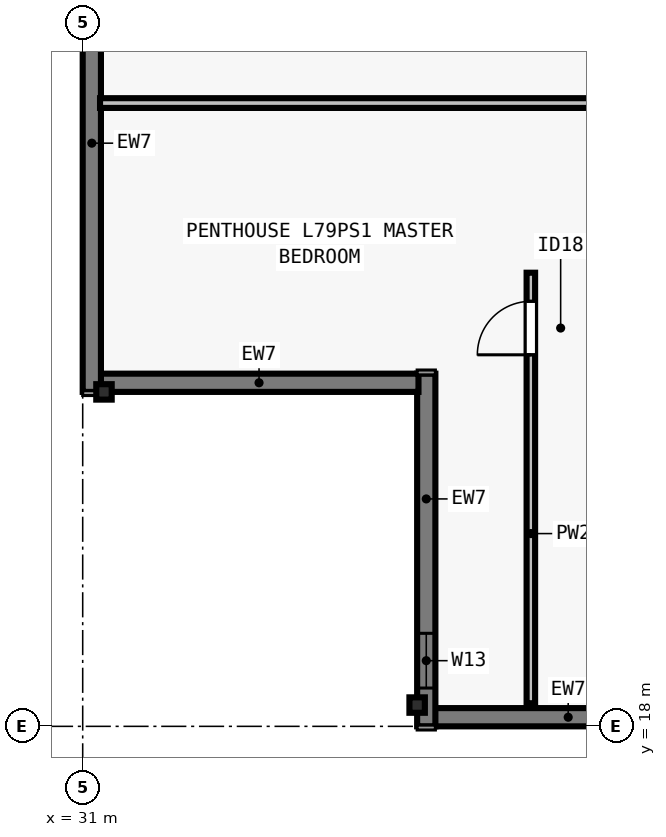
"""IFC4 building model, lengths in metres.
Left out: names, types, materials, properties, quantities, classifications, styles, units other than length and angle.
Written with IfcOpenShell. Run it as: python <this file> out.ifc"""

import sys

from ifc_helpers import new_model, si_unit, direction, frame, frame_2d, origin, origin_2d, place, context, subcontext, project, spatial, rectangle, i_section, extrude, element, fill, save


model = new_model("IFC4")
c1 = context("Model", 3, precision=1e-05, world=origin(), true_north=direction((0.0, 1.0)))
c2 = subcontext(c1, "Body", "Model", "MODEL_VIEW")
j1 = project(units=[si_unit("LENGTHUNIT", "METRE"), si_unit("PLANEANGLEUNIT", "RADIAN")], contexts=[c1])
p1 = place(None, origin())
s1 = spatial("IfcSite", under=j1, at=p1, CompositionType="ELEMENT")
p2 = place(p1, origin())
s2 = spatial("IfcBuilding", under=s1, at=p2, CompositionType="ELEMENT")
p3 = place(p2, frame((0.0, 0.0, 287.5)))
s3 = spatial("IfcBuildingStorey", under=s2, at=p3, CompositionType="ELEMENT", Elevation=287.5)
for number, where, z_axis, x_axis in (
    (1, (36.5, 18.35, 0.0), (0.0, 0.0, 1.0), (1.0, 0.0, 0.0)),
    (2, (31.35, 23.5, 0.0), (0.0, 0.0, 1.0), (0.0, 1.0, 0.0)),
):
    element("IfcColumn", number, at=place(p3, frame(where, z_axis=z_axis, x_axis=x_axis)), inside=s3, PredefinedType="COLUMN", context=c2, shape_type="SweptSolid", body=[
        extrude(i_section(OverallWidth=0.254, OverallDepth=0.254, WebThickness=0.009, FlangeThickness=0.014, FilletRadius=0.013, at=origin_2d()), origin(), (0.0, 0.0, 1.0), 3.5),
    ])
p4 = place(p3, frame((59.0, 18.15, 0.0), z_axis=(0.0, 0.0, 1.0), x_axis=(-1.0, 0.0, 0.0)))
e3 = element("IfcWall", 3, at=p4, inside=s3, PredefinedType="SOLIDWALL", context=c2, shape_type="SweptSolid", body=[
    extrude(rectangle(XDim=22.222, YDim=0.3, at=frame_2d((11.111, 0.0))), origin(), (0.0, 0.0, 1.0), 3.29),
])
p5 = place(p4, frame((2.812, 0.0, 0.8)))
e4 = element("IfcOpeningElement", 4, at=p5, cuts=e3, PredefinedType="OPENING", context=c2, shape_type="SweptSolid", body=[
    extrude(rectangle(XDim=2.0, YDim=1.758, at=frame_2d((1.0, 0.879))), frame((0.0, 0.16, 0.0), z_axis=(0.0, -1.0, 0.0), x_axis=(1.0, 0.0, 0.0)), (0.0, 0.0, 1.0), 0.32),
])
p6 = place(p4, frame((6.012, 0.0, 0.8)))
e5 = element("IfcOpeningElement", 5, at=p6, cuts=e3, PredefinedType="OPENING", context=c2, shape_type="SweptSolid", body=[
    extrude(rectangle(XDim=1.65, YDim=1.758, at=frame_2d((0.825, 0.879))), frame((0.0, 0.16, 0.0), z_axis=(0.0, -1.0, 0.0), x_axis=(1.0, 0.0, 0.0)), (0.0, 0.0, 1.0), 0.32),
])
p7 = place(p4, frame((8.811, 0.0, 0.8)))
e6 = element("IfcOpeningElement", 6, at=p7, cuts=e3, PredefinedType="OPENING", context=c2, shape_type="SweptSolid", body=[
    extrude(rectangle(XDim=2.0, YDim=1.758, at=frame_2d((1.0, 0.879))), frame((0.0, 0.16, 0.0), z_axis=(0.0, -1.0, 0.0), x_axis=(1.0, 0.0, 0.0)), (0.0, 0.0, 1.0), 0.32),
])
p8 = place(p4, frame((12.41, 0.0, 0.8)))
e7 = element("IfcOpeningElement", 7, at=p8, cuts=e3, PredefinedType="OPENING", context=c2, shape_type="SweptSolid", body=[
    extrude(rectangle(XDim=1.65, YDim=1.758, at=frame_2d((0.825, 0.879))), frame((0.0, 0.16, 0.0), z_axis=(0.0, -1.0, 0.0), x_axis=(1.0, 0.0, 0.0)), (0.0, 0.0, 1.0), 0.32),
])
p9 = place(p4, frame((15.66, 0.0, 0.8)))
e8 = element("IfcOpeningElement", 8, at=p9, cuts=e3, PredefinedType="OPENING", context=c2, shape_type="SweptSolid", body=[
    extrude(rectangle(XDim=2.0, YDim=1.758, at=frame_2d((1.0, 0.879))), frame((0.0, 0.16, 0.0), z_axis=(0.0, -1.0, 0.0), x_axis=(1.0, 0.0, 0.0)), (0.0, 0.0, 1.0), 0.32),
])
p10 = place(p3, frame((36.65, 18.0, 0.0), z_axis=(0.0, 0.0, 1.0), x_axis=(0.0, 1.0, 0.0)))
e9 = element("IfcWall", 9, at=p10, inside=s3, PredefinedType="SOLIDWALL", context=c2, shape_type="SweptSolid", body=[
    extrude(rectangle(XDim=5.8, YDim=0.3, at=frame_2d((2.9, 0.0))), origin(), (0.0, 0.0, 1.0), 3.29),
])
p11 = place(p10, frame((0.63, 0.0, 0.8)))
e10 = element("IfcOpeningElement", 10, at=p11, cuts=e9, PredefinedType="OPENING", context=c2, shape_type="SweptSolid", body=[
    extrude(rectangle(XDim=0.9, YDim=1.75, at=frame_2d((0.45, 0.875))), frame((0.0, 0.16, 0.0), z_axis=(0.0, -1.0, 0.0), x_axis=(1.0, 0.0, 0.0)), (0.0, 0.0, 1.0), 0.32),
])
p12 = place(p3, frame((36.522, 23.65, 0.0), z_axis=(0.0, 0.0, 1.0), x_axis=(-1.0, 0.0, 0.0)))
e11 = element("IfcWall", 11, at=p12, inside=s3, PredefinedType="SOLIDWALL", context=c2, shape_type="SweptSolid", body=[
    extrude(rectangle(XDim=5.244, YDim=0.3, at=frame_2d((2.622, 0.0))), origin(), (0.0, 0.0, 1.0), 3.29),
])
p13 = place(p3, frame((31.15, 23.5, 0.0), z_axis=(0.0, 0.0, 1.0), x_axis=(0.0, 1.0, 0.0)))
e12 = element("IfcWall", 12, at=p13, inside=s3, PredefinedType="SOLIDWALL", context=c2, shape_type="SweptSolid", body=[
    extrude(rectangle(XDim=30.722, YDim=0.3, at=frame_2d((15.361, 0.0))), origin(), (0.0, 0.0, 1.0), 3.29),
])
p14 = place(p13, frame((8.331, 0.0, 0.8)))
e13 = element("IfcOpeningElement", 13, at=p14, cuts=e12, PredefinedType="OPENING", context=c2, shape_type="SweptSolid", body=[
    extrude(rectangle(XDim=1.65, YDim=1.758, at=frame_2d((0.825, 0.879))), frame((0.0, 0.16, 0.0), z_axis=(0.0, -1.0, 0.0), x_axis=(1.0, 0.0, 0.0)), (0.0, 0.0, 1.0), 0.32),
])
p15 = place(p13, frame((12.442, 0.0, 0.8)))
e14 = element("IfcOpeningElement", 14, at=p15, cuts=e12, PredefinedType="OPENING", context=c2, shape_type="SweptSolid", body=[
    extrude(rectangle(XDim=2.0, YDim=1.758, at=frame_2d((1.0, 0.879))), frame((0.0, 0.16, 0.0), z_axis=(0.0, -1.0, 0.0), x_axis=(1.0, 0.0, 0.0)), (0.0, 0.0, 1.0), 0.32),
])
p16 = place(p13, frame((17.304, 0.0, 0.8)))
e15 = element("IfcOpeningElement", 15, at=p16, cuts=e12, PredefinedType="OPENING", context=c2, shape_type="SweptSolid", body=[
    extrude(rectangle(XDim=1.65, YDim=1.758, at=frame_2d((0.825, 0.879))), frame((0.0, 0.16, 0.0), z_axis=(0.0, -1.0, 0.0), x_axis=(1.0, 0.0, 0.0)), (0.0, 0.0, 1.0), 0.32),
])
p17 = place(p13, frame((20.967, 0.0, 0.8)))
e16 = element("IfcOpeningElement", 16, at=p17, cuts=e12, PredefinedType="OPENING", context=c2, shape_type="SweptSolid", body=[
    extrude(rectangle(XDim=2.0, YDim=1.758, at=frame_2d((1.0, 0.879))), frame((0.0, 0.16, 0.0), z_axis=(0.0, -1.0, 0.0), x_axis=(1.0, 0.0, 0.0)), (0.0, 0.0, 1.0), 0.32),
])
p18 = place(p13, frame((26.63, 0.0, 0.8)))
e17 = element("IfcOpeningElement", 17, at=p18, cuts=e12, PredefinedType="OPENING", context=c2, shape_type="SweptSolid", body=[
    extrude(rectangle(XDim=0.9, YDim=1.75, at=frame_2d((0.45, 0.875))), frame((0.0, 0.16, 0.0), z_axis=(0.0, -1.0, 0.0), x_axis=(1.0, 0.0, 0.0)), (0.0, 0.0, 1.0), 0.32),
])
p19 = place(p3, frame((31.285, 28.25, 0.0), z_axis=(0.0, 0.0, 1.0), x_axis=(1.0, 0.0, 0.0)))
e18 = element("IfcWall", 18, at=p19, inside=s3, PredefinedType="PARTITIONING", context=c2, shape_type="SweptSolid", body=[
    extrude(rectangle(XDim=41.43, YDim=0.16, at=frame_2d((20.715, 0.0))), origin(), (0.0, 0.0, 1.0), 3.009),
])
p20 = place(p19, frame((20.235, 0.0, 0.0)))
e19 = element("IfcOpeningElement", 19, at=p20, cuts=e18, PredefinedType="OPENING", context=c2, shape_type="SweptSolid", body=[
    extrude(rectangle(XDim=0.96, YDim=2.18, at=frame_2d((0.48, 1.09))), frame((0.0, 0.09, 0.0), z_axis=(0.0, -1.0, 0.0), x_axis=(1.0, 0.0, 0.0)), (0.0, 0.0, 1.0), 0.18),
])
p21 = place(p3, frame((38.37, 18.38, 0.0), z_axis=(0.0, 0.0, 1.0), x_axis=(0.0, 1.0, 0.0)))
e20 = element("IfcWall", 20, at=p21, inside=s3, PredefinedType="PARTITIONING", context=c2, shape_type="SweptSolid", body=[
    extrude(rectangle(XDim=7.08, YDim=0.14, at=frame_2d((3.54, 0.0))), origin(), (0.0, 0.0, 1.0), 2.653),
])
p22 = place(p21, frame((5.73, 0.0, 0.0)))
e21 = element("IfcOpeningElement", 21, at=p22, cuts=e20, PredefinedType="OPENING", context=c2, shape_type="SweptSolid", body=[
    extrude(rectangle(XDim=0.88, YDim=2.1, at=frame_2d((0.44, 1.05))), frame((0.0, 0.08, 0.0), z_axis=(0.0, -1.0, 0.0), x_axis=(1.0, 0.0, 0.0)), (0.0, 0.0, 1.0), 0.16),
])
p23 = place(p11, origin())
e22 = element("IfcWindow", 22, at=p23, inside=s3, PartitioningType="SINGLE_PANEL", PredefinedType="WINDOW", context=c2, shape_type="SweptSolid", body=[
    extrude(rectangle(XDim=0.9, YDim=1.75, at=frame_2d((0.45, 0.875))), frame((0.0, -0.04, 0.0), z_axis=(0.0, -1.0, 0.0), x_axis=(1.0, 0.0, 0.0)), (0.0, 0.0, 1.0), 0.06),
])
fill(e10, e22)
p24 = place(p22, origin())
e23 = element("IfcDoor", 23, at=p24, inside=s3, OperationType="SINGLE_SWING_LEFT", PredefinedType="DOOR", context=c2, shape_type="SweptSolid", body=[
    extrude(rectangle(XDim=0.88, YDim=2.1, at=frame_2d((0.44, 1.05))), frame((0.0, 0.025, 0.0), z_axis=(0.0, -1.0, 0.0), x_axis=(1.0, 0.0, 0.0)), (0.0, 0.0, 1.0), 0.05),
])
fill(e21, e23)
save(model, sys.argv[1])
